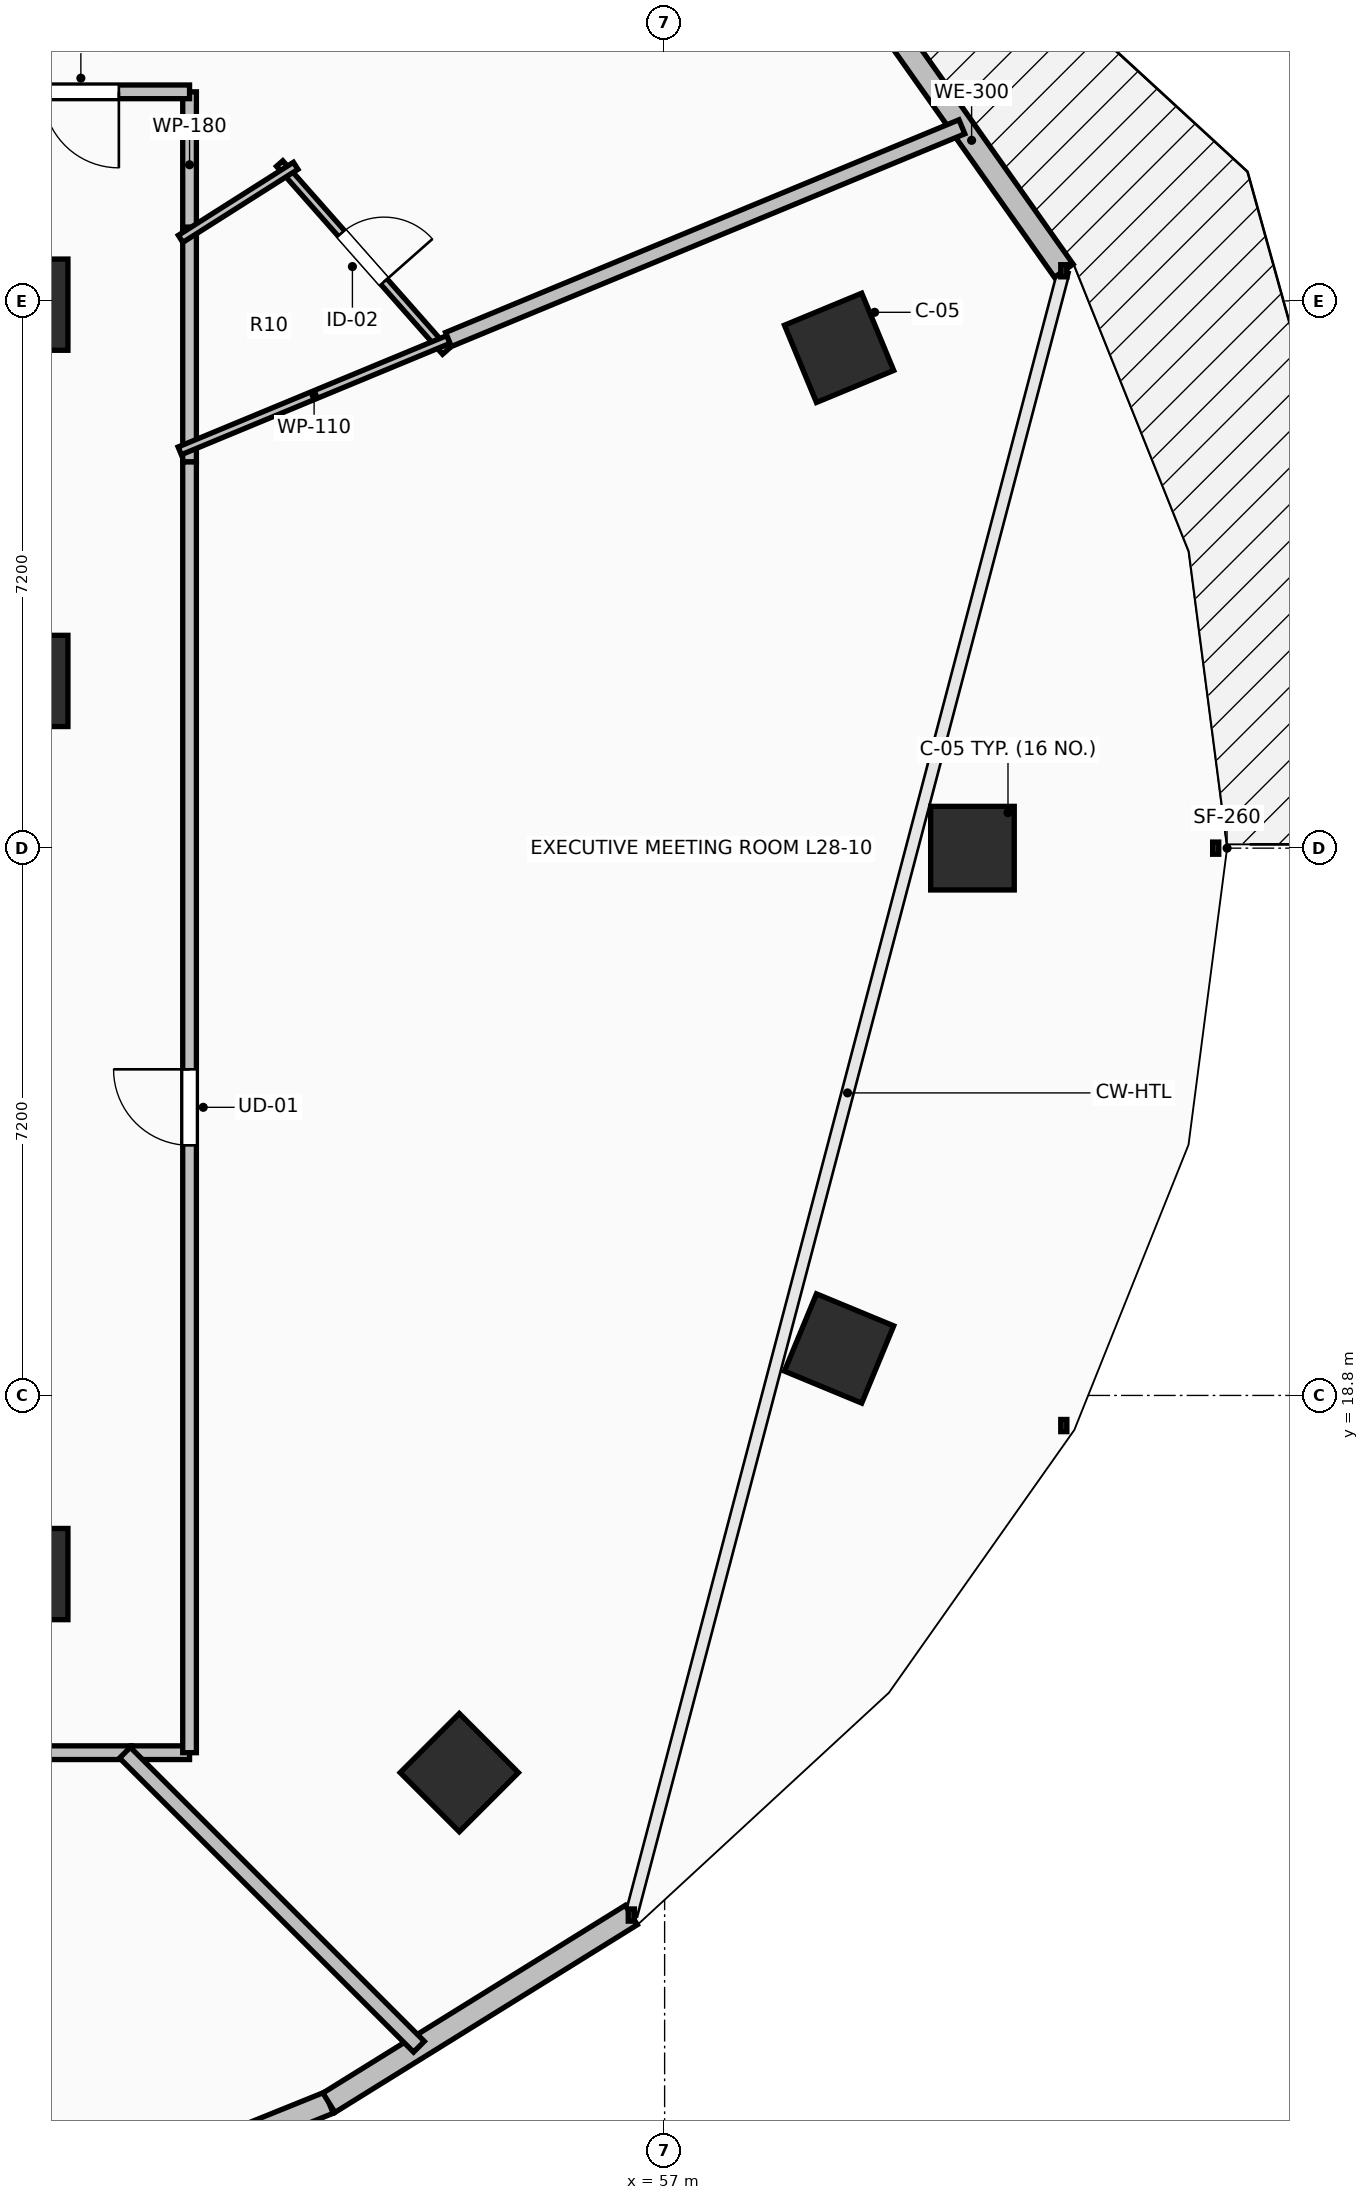
"""IFC4 building model, lengths in metres.
Left out: names, types, materials, properties, quantities, classifications, styles, units other than length and angle.
Written with IfcOpenShell. Run it as: python <this file> out.ifc"""

import sys

from ifc_helpers import new_model, si_unit, direction, frame, frame_2d, origin, origin_2d, place, context, subcontext, project, spatial, rectangle, extrude, element, fill, save


model = new_model("IFC4")
c1 = context("Model", 3, precision=1e-05, world=origin(), true_north=direction((0.0, 1.0)))
c2 = subcontext(c1, "Body", "Model", "MODEL_VIEW")
j1 = project(units=[si_unit("LENGTHUNIT", "METRE"), si_unit("PLANEANGLEUNIT", "RADIAN")], contexts=[c1])
p1 = place(None, origin())
s1 = spatial("IfcSite", under=j1, at=p1, CompositionType="ELEMENT")
p2 = place(p1, origin())
s2 = spatial("IfcBuilding", under=s1, at=p2, CompositionType="ELEMENT")
p3 = place(p2, frame((0.0, 0.0, 106.8)))
s3 = spatial("IfcBuildingStorey", under=s2, at=p3, CompositionType="ELEMENT", Elevation=106.8)
for number, where, z_axis, x_axis in (
    (1, (61.05, 26.0, 0.0), (0.0, 0.0, 1.0), (1.0, 0.0, 0.0)),
    (2, (59.295, 32.582, 0.0), (0.0, 0.0, 1.0), (0.924, 0.383, 0.0)),
    (3, (54.299, 13.838, 0.0), (0.0, 0.0, 1.0), (0.707, -0.707, 0.0)),
    (4, (59.295, 19.418, 0.0), (0.0, 0.0, 1.0), (0.924, -0.383, 0.0)),
):
    element("IfcColumn", number, at=place(p3, frame(where, z_axis=z_axis, x_axis=x_axis)), inside=s3, PredefinedType="COLUMN", context=c2, shape_type="SweptSolid", body=[
        extrude(rectangle(XDim=1.1, YDim=1.1, at=origin_2d()), origin(), (0.0, 0.0, 1.0), 3.5),
    ])
for number, where, z_axis, x_axis in (
    (5, (48.75, 33.15, 0.0), (0.0, 0.0, 1.0), (1.0, 0.0, 0.0)),
    (6, (48.75, 28.2, 0.0), (0.0, 0.0, 1.0), (1.0, 0.0, 0.0)),
    (7, (48.75, 16.45, 0.0), (0.0, 0.0, 1.0), (1.0, 0.0, 0.0)),
):
    element("IfcColumn", number, at=place(p3, frame(where, z_axis=z_axis, x_axis=x_axis)), inside=s3, PredefinedType="PILASTER", context=c2, shape_type="SweptSolid", body=[
        extrude(rectangle(XDim=0.8, YDim=1.2, at=origin_2d()), origin(), (0.0, 0.0, 1.0), 3.5),
    ])
p4 = place(p3, frame((62.252, 33.596, 0.0), z_axis=(0.0, 0.0, 1.0), x_axis=(-0.57716435238, 0.81662801222, 0.0)))
e8 = element("IfcWall", 8, at=p4, inside=s3, PredefinedType="STANDARD", context=c2, shape_type="SweptSolid", body=[
    extrude(rectangle(XDim=4.202, YDim=0.3, at=frame_2d((2.101, 0.0))), origin(), (0.0, 0.0, 1.0), 3.24),
])
p5 = place(p3, frame((48.045, 7.661, 0.0), z_axis=(0.0, 0.0, 1.0), x_axis=(0.927122233109, 0.374759075775, 0.0)))
e9 = element("IfcWall", 9, at=p5, inside=s3, PredefinedType="STANDARD", context=c2, shape_type="SweptSolid", body=[
    extrude(rectangle(XDim=4.895, YDim=0.3, at=frame_2d((2.448, 0.0))), origin(), (0.0, 0.0, 1.0), 3.24),
])
p6 = place(p3, frame((52.584, 9.495, 0.0), z_axis=(0.0, 0.0, 1.0), x_axis=(0.849684479743, 0.527291461038, 0.0)))
e10 = element("IfcWall", 10, at=p6, inside=s3, PredefinedType="STANDARD", context=c2, shape_type="SweptSolid", body=[
    extrude(rectangle(XDim=4.681, YDim=0.3, at=frame_2d((2.341, 0.0))), origin(), (0.0, 0.0, 1.0), 3.24),
])
p7 = place(p3, frame((50.75, 34.031, 0.0), z_axis=(0.0, 0.0, 1.0), x_axis=(0.0, 1.0, 0.0)))
e11 = element("IfcWall", 11, at=p7, inside=s3, PredefinedType="PARTITIONING", context=c2, shape_type="SweptSolid", body=[
    extrude(rectangle(XDim=1.919, YDim=0.18, at=frame_2d((0.959, 0.0))), origin(), (0.0, 0.0, 1.0), 2.432),
])
p8 = place(p3, frame((50.75, 35.95, 0.0), z_axis=(0.0, 0.0, 1.0), x_axis=(-1.0, 0.0, 0.0)))
e12 = element("IfcWall", 12, at=p8, inside=s3, PredefinedType="PARTITIONING", context=c2, shape_type="SweptSolid", body=[
    extrude(rectangle(XDim=2.86, YDim=0.18, at=frame_2d((1.43, 0.0))), origin(), (0.0, 0.0, 1.0), 2.432),
])
p9 = place(p8, frame((0.93, 0.0, 0.0)))
e13 = element("IfcOpeningElement", 13, at=p9, cuts=e12, PredefinedType="OPENING", context=c2, shape_type="SweptSolid", body=[
    extrude(rectangle(XDim=1.0, YDim=2.15, at=frame_2d((0.5, 1.075))), frame((0.0, 0.105, 0.0), z_axis=(0.0, -1.0, 0.0), x_axis=(1.0, 0.0, 0.0)), (0.0, 0.0, 1.0), 0.21),
])
p10 = place(p3, frame((50.75, 31.081, 0.0), z_axis=(0.0, 0.0, 1.0), x_axis=(0.0, 1.0, 0.0)))
e14 = element("IfcWall", 14, at=p10, inside=s3, PredefinedType="PARTITIONING", context=c2, shape_type="SweptSolid", body=[
    extrude(rectangle(XDim=3.09, YDim=0.18, at=frame_2d((1.545, 0.0))), origin(), (0.0, 0.0, 1.0), 2.432),
])
p11 = place(p3, frame((42.34, 14.1, 0.0), z_axis=(0.0, 0.0, 1.0), x_axis=(1.0, 0.0, 0.0)))
e15 = element("IfcWall", 15, at=p11, inside=s3, PredefinedType="PARTITIONING", context=c2, shape_type="SweptSolid", body=[
    extrude(rectangle(XDim=7.645, YDim=0.18, at=frame_2d((3.823, 0.0))), origin(), (0.0, 0.0, 1.0), 2.432),
])
p12 = place(p3, frame((49.985, 14.1, 0.0), z_axis=(0.0, 0.0, 1.0), x_axis=(1.0, 0.0, 0.0)))
e16 = element("IfcWall", 16, at=p12, inside=s3, PredefinedType="PARTITIONING", context=c2, shape_type="SweptSolid", body=[
    extrude(rectangle(XDim=0.765, YDim=0.18, at=frame_2d((0.382, 0.0))), origin(), (0.0, 0.0, 1.0), 2.972),
])
p13 = place(p3, frame((50.75, 14.1, 0.0), z_axis=(0.0, 0.0, 1.0), x_axis=(0.0, 1.0, 0.0)))
e17 = element("IfcWall", 17, at=p13, inside=s3, PredefinedType="PARTITIONING", context=c2, shape_type="SweptSolid", body=[
    extrude(rectangle(XDim=16.981, YDim=0.18, at=frame_2d((8.49, 0.0))), origin(), (0.0, 0.0, 1.0), 2.432),
])
p14 = place(p13, frame((7.99, 0.0, 0.0)))
e18 = element("IfcOpeningElement", 18, at=p14, cuts=e17, PredefinedType="OPENING", context=c2, shape_type="SweptSolid", body=[
    extrude(rectangle(XDim=1.0, YDim=2.15, at=frame_2d((0.5, 1.075))), frame((0.0, 0.105, 0.0), z_axis=(0.0, -1.0, 0.0), x_axis=(1.0, 0.0, 0.0)), (0.0, 0.0, 1.0), 0.21),
])
p15 = place(p3, frame((51.935, 35.007, 0.0), z_axis=(0.0, 0.0, 1.0), x_axis=(0.662059609276, -0.749451181709, 0.0)))
e19 = element("IfcWall", 19, at=p15, inside=s3, PredefinedType="PARTITIONING", context=c2, shape_type="SweptSolid", body=[
    extrude(rectangle(XDim=3.299, YDim=0.11, at=frame_2d((1.65, 0.0))), origin(), (0.0, 0.0, 1.0), 2.432),
])
p16 = place(p15, frame((1.225, 0.0, 0.0)))
e20 = element("IfcOpeningElement", 20, at=p16, cuts=e19, PredefinedType="OPENING", context=c2, shape_type="SweptSolid", body=[
    extrude(rectangle(XDim=0.85, YDim=2.1, at=frame_2d((0.425, 1.05))), frame((0.0, 0.07, 0.0), z_axis=(0.0, -1.0, 0.0), x_axis=(1.0, 0.0, 0.0)), (0.0, 0.0, 1.0), 0.14),
])
p17 = place(p3, frame((54.156, 32.693, 0.0), z_axis=(0.0, 0.0, 1.0), x_axis=(-0.923803754276, -0.382866326002, 0.0)))
e21 = element("IfcWall", 21, at=p17, inside=s3, PredefinedType="PARTITIONING", context=c2, shape_type="SweptSolid", body=[
    extrude(rectangle(XDim=3.827, YDim=0.11, at=frame_2d((1.914, 0.0))), origin(), (0.0, 0.0, 1.0), 2.432),
])
p18 = place(p3, frame((50.632, 34.016, 0.0), z_axis=(0.0, 0.0, 1.0), x_axis=(0.844361394482, 0.535774052665, 0.0)))
e22 = element("IfcWall", 22, at=p18, inside=s3, PredefinedType="PARTITIONING", context=c2, shape_type="SweptSolid", body=[
    extrude(rectangle(XDim=1.793, YDim=0.11, at=frame_2d((0.897, 0.0))), origin(), (0.0, 0.0, 1.0), 2.886),
])
p19 = place(p3, frame((49.053, 37.053, 0.0), z_axis=(0.0, 0.0, 1.0), x_axis=(-0.707106781187, -0.707106781187, 0.0)))
e23 = element("IfcWall", 23, at=p19, inside=s3, PredefinedType="PARTITIONING", context=c2, shape_type="SweptSolid", body=[
    extrude(rectangle(XDim=1.7, YDim=0.2, at=frame_2d((0.85, 0.0))), origin(), (0.0, 0.0, 1.0), 2.432),
])
p20 = place(p3, frame((54.156, 32.692, 0.0), z_axis=(0.0, 0.0, 1.0), x_axis=(0.923875192571, 0.38269390974, 0.0)))
e24 = element("IfcWall", 24, at=p20, inside=s3, PredefinedType="PARTITIONING", context=c2, shape_type="SweptSolid", body=[
    extrude(rectangle(XDim=7.311, YDim=0.2, at=frame_2d((3.656, 0.0))), origin(), (0.0, 0.0, 1.0), 2.432),
])
p21 = place(p3, frame((53.768, 10.232, 0.0), z_axis=(0.0, 0.0, 1.0), x_axis=(-0.707106781187, 0.707106781187, 0.0)))
e25 = element("IfcWall", 25, at=p21, inside=s3, PredefinedType="PARTITIONING", context=c2, shape_type="SweptSolid", body=[
    extrude(rectangle(XDim=5.47, YDim=0.2, at=frame_2d((2.735, 0.0))), origin(), (0.0, 0.0, 1.0), 2.677),
])
p22 = place(p9, origin())
e26 = element("IfcDoor", 26, at=p22, inside=s3, OperationType="SINGLE_SWING_LEFT", PredefinedType="DOOR", context=c2, shape_type="SweptSolid", body=[
    extrude(rectangle(XDim=1.0, YDim=2.15, at=frame_2d((0.5, 1.075))), frame((0.0, 0.025, 0.0), z_axis=(0.0, -1.0, 0.0), x_axis=(1.0, 0.0, 0.0)), (0.0, 0.0, 1.0), 0.05),
])
fill(e13, e26)
p23 = place(p14, origin())
e27 = element("IfcDoor", 27, at=p23, inside=s3, OperationType="SINGLE_SWING_RIGHT", PredefinedType="DOOR", context=c2, shape_type="SweptSolid", body=[
    extrude(rectangle(XDim=1.0, YDim=2.15, at=frame_2d((0.5, 1.075))), frame((0.0, 0.025, 0.0), z_axis=(0.0, -1.0, 0.0), x_axis=(1.0, 0.0, 0.0)), (0.0, 0.0, 1.0), 0.05),
])
fill(e18, e27)
p24 = place(p16, origin())
e28 = element("IfcDoor", 28, at=p24, inside=s3, OperationType="SINGLE_SWING_RIGHT", PredefinedType="DOOR", context=c2, shape_type="SweptSolid", body=[
    extrude(rectangle(XDim=0.85, YDim=2.1, at=frame_2d((0.425, 1.05))), frame((0.0, 0.025, 0.0), z_axis=(0.0, -1.0, 0.0), x_axis=(1.0, 0.0, 0.0)), (0.0, 0.0, 1.0), 0.05),
])
fill(e20, e28)
save(model, sys.argv[1])
